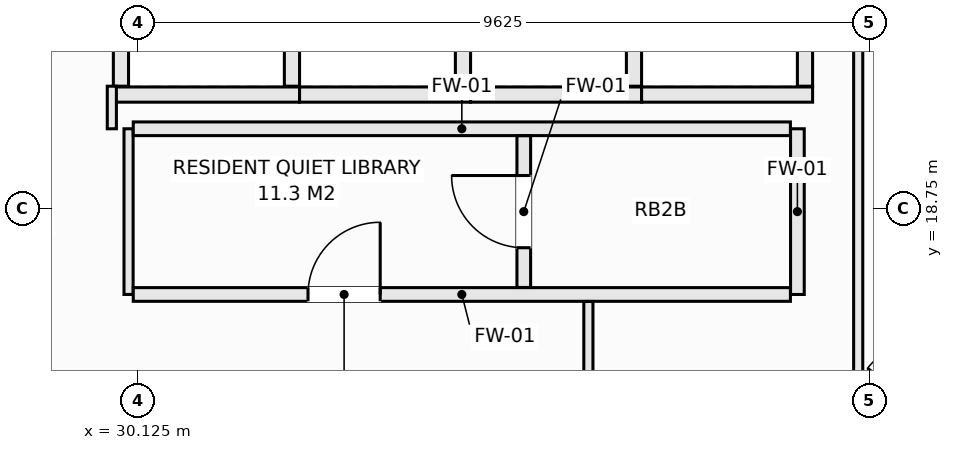
"""IFC4 building model, lengths in metres.
Left out: names, types, materials, properties, quantities, classifications, styles, units other than length and angle.
Written with IfcOpenShell. Run it as: python <this file> out.ifc"""

import sys

from ifc_helpers import new_model, si_unit, direction, frame, frame_2d, origin, place, context, subcontext, project, spatial, rectangle, extrude, element, fill, save


model = new_model("IFC4")
c1 = context("Model", 3, precision=1e-05, world=origin(), true_north=direction((0.0, 1.0)))
c2 = subcontext(c1, "Body", "Model", "MODEL_VIEW")
j1 = project(units=[si_unit("LENGTHUNIT", "METRE"), si_unit("PLANEANGLEUNIT", "RADIAN")], contexts=[c1])
p1 = place(None, origin())
s1 = spatial("IfcSite", under=j1, at=p1, CompositionType="ELEMENT")
p2 = place(p1, origin())
s2 = spatial("IfcBuilding", under=s1, at=p2, CompositionType="ELEMENT")
p3 = place(p2, frame((0.0, 0.0, 252.5)))
s3 = spatial("IfcBuildingStorey", under=s2, at=p3, CompositionType="ELEMENT", Elevation=252.5)
p4 = place(p3, frame((29.8, 20.25, 0.0), z_axis=(0.0, 0.0, 1.0), x_axis=(1.0, 0.0, 0.0)))
e1 = element("IfcWall", 1, at=p4, inside=s3, PredefinedType="SOLIDWALL", context=c2, shape_type="SweptSolid", body=[
    extrude(rectangle(XDim=2.45, YDim=0.2, at=frame_2d((1.225, 0.0))), origin(), (0.0, 0.0, 1.0), 3.03),
])
for number, where, z_axis, x_axis in (
    (2, (29.9, 20.36, 0.0), (0.0, 0.0, 1.0), (0.0, 1.0, 0.0)),
    (3, (32.15, 20.36, 0.0), (0.0, 0.0, 1.0), (0.0, 1.0, 0.0)),
):
    element("IfcWall", number, at=place(p3, frame(where, z_axis=z_axis, x_axis=x_axis)), inside=s3, PredefinedType="SOLIDWALL", context=c2, shape_type="SweptSolid", body=[
        extrude(rectangle(XDim=2.43, YDim=0.2, at=frame_2d((1.215, 0.0))), origin(), (0.0, 0.0, 1.0), 3.03),
    ])
p5 = place(p3, frame((32.25, 20.25, 0.0), z_axis=(0.0, 0.0, 1.0), x_axis=(1.0, 0.0, 0.0)))
e4 = element("IfcWall", 4, at=p5, inside=s3, PredefinedType="SOLIDWALL", context=c2, shape_type="SweptSolid", body=[
    extrude(rectangle(XDim=2.25, YDim=0.2, at=frame_2d((1.125, 0.0))), origin(), (0.0, 0.0, 1.0), 3.03),
])
p6 = place(p3, frame((34.4, 20.36, 0.0), z_axis=(0.0, 0.0, 1.0), x_axis=(0.0, 1.0, 0.0)))
e5 = element("IfcWall", 5, at=p6, inside=s3, PredefinedType="SOLIDWALL", context=c2, shape_type="SweptSolid", body=[
    extrude(rectangle(XDim=2.43, YDim=0.2, at=frame_2d((1.215, 0.0))), origin(), (0.0, 0.0, 1.0), 3.03),
])
p7 = place(p3, frame((34.5, 20.25, 0.0), z_axis=(0.0, 0.0, 1.0), x_axis=(1.0, 0.0, 0.0)))
e6 = element("IfcWall", 6, at=p7, inside=s3, PredefinedType="SOLIDWALL", context=c2, shape_type="SweptSolid", body=[
    extrude(rectangle(XDim=2.25, YDim=0.2, at=frame_2d((1.125, 0.0))), origin(), (0.0, 0.0, 1.0), 3.03),
])
p8 = place(p3, frame((36.65, 20.36, 0.0), z_axis=(0.0, 0.0, 1.0), x_axis=(0.0, 1.0, 0.0)))
e7 = element("IfcWall", 7, at=p8, inside=s3, PredefinedType="SOLIDWALL", context=c2, shape_type="SweptSolid", body=[
    extrude(rectangle(XDim=2.43, YDim=0.2, at=frame_2d((1.215, 0.0))), origin(), (0.0, 0.0, 1.0), 3.03),
])
p9 = place(p3, frame((36.75, 20.25, 0.0), z_axis=(0.0, 0.0, 1.0), x_axis=(1.0, 0.0, 0.0)))
e8 = element("IfcWall", 8, at=p9, inside=s3, PredefinedType="SOLIDWALL", context=c2, shape_type="SweptSolid", body=[
    extrude(rectangle(XDim=2.25, YDim=0.2, at=frame_2d((1.125, 0.0))), origin(), (0.0, 0.0, 1.0), 3.03),
])
p10 = place(p3, frame((38.9, 20.36, 0.0), z_axis=(0.0, 0.0, 1.0), x_axis=(0.0, 1.0, 0.0)))
e9 = element("IfcWall", 9, at=p10, inside=s3, PredefinedType="SOLIDWALL", context=c2, shape_type="SweptSolid", body=[
    extrude(rectangle(XDim=2.43, YDim=0.2, at=frame_2d((1.215, 0.0))), origin(), (0.0, 0.0, 1.0), 3.03),
])
p11 = place(p3, frame((30.0, 17.62, 0.0), z_axis=(0.0, 0.0, 1.0), x_axis=(0.0, 1.0, 0.0)))
e10 = element("IfcWall", 10, at=p11, inside=s3, PredefinedType="PARTITIONING", context=c2, shape_type="SweptSolid", body=[
    extrude(rectangle(XDim=2.18, YDim=0.12, at=frame_2d((1.09, 0.0))), origin(), (0.0, 0.0, 1.0), 3.03),
])
p12 = place(p3, frame((38.8, 17.62, 0.0), z_axis=(0.0, 0.0, 1.0), x_axis=(0.0, 1.0, 0.0)))
e11 = element("IfcWall", 11, at=p12, inside=s3, PredefinedType="SOLIDWALL", context=c2, shape_type="SweptSolid", body=[
    extrude(rectangle(XDim=2.18, YDim=0.18, at=frame_2d((1.09, 0.0))), origin(), (0.0, 0.0, 1.0), 3.03),
])
p13 = place(p3, frame((30.062, 17.62, 0.0), z_axis=(0.0, 0.0, 1.0), x_axis=(1.0, 0.0, 0.0)))
e12 = element("IfcWall", 12, at=p13, inside=s3, PredefinedType="SOLIDWALL", context=c2, shape_type="SweptSolid", body=[
    extrude(rectangle(XDim=8.646, YDim=0.18, at=frame_2d((4.323, 0.0))), origin(), (0.0, 0.0, 1.0), 3.03),
])
p14 = place(p13, frame((2.299, 0.0, 0.0)))
e13 = element("IfcOpeningElement", 13, at=p14, cuts=e12, PredefinedType="OPENING", context=c2, shape_type="SweptSolid", body=[
    extrude(rectangle(XDim=0.95, YDim=2.1, at=frame_2d((0.475, 1.05))), frame((0.0, 0.1, 0.0), z_axis=(0.0, -1.0, 0.0), x_axis=(1.0, 0.0, 0.0)), (0.0, 0.0, 1.0), 0.2),
])
p15 = place(p3, frame((30.062, 19.8, 0.0), z_axis=(0.0, 0.0, 1.0), x_axis=(1.0, 0.0, 0.0)))
e14 = element("IfcWall", 14, at=p15, inside=s3, PredefinedType="SOLIDWALL", context=c2, shape_type="SweptSolid", body=[
    extrude(rectangle(XDim=8.646, YDim=0.18, at=frame_2d((4.323, 0.0))), origin(), (0.0, 0.0, 1.0), 3.03),
])
p16 = place(p3, frame((35.2, 17.712, 0.0), z_axis=(0.0, 0.0, 1.0), x_axis=(0.0, 1.0, 0.0)))
e15 = element("IfcWall", 15, at=p16, inside=s3, PredefinedType="SOLIDWALL", context=c2, shape_type="SweptSolid", body=[
    extrude(rectangle(XDim=1.996, YDim=0.18, at=frame_2d((0.998, 0.0))), origin(), (0.0, 0.0, 1.0), 3.03),
])
p17 = place(p16, frame((0.523, 0.0, 0.0)))
e16 = element("IfcOpeningElement", 16, at=p17, cuts=e15, PredefinedType="OPENING", context=c2, shape_type="SweptSolid", body=[
    extrude(rectangle(XDim=0.95, YDim=2.1, at=frame_2d((0.475, 1.05))), frame((0.0, 0.1, 0.0), z_axis=(0.0, -1.0, 0.0), x_axis=(1.0, 0.0, 0.0)), (0.0, 0.0, 1.0), 0.2),
])
p18 = place(p3, frame((39.6, 14.952, 0.0), z_axis=(0.0, 0.0, 1.0), x_axis=(0.0, 1.0, 0.0)))
e17 = element("IfcWall", 17, at=p18, inside=s3, PredefinedType="PARTITIONING", context=c2, shape_type="SweptSolid", body=[
    extrude(rectangle(XDim=8.068, YDim=0.12, at=frame_2d((4.034, 0.0))), origin(), (0.0, 0.0, 1.0), 2.478),
])
p19 = place(p3, frame((39.662, 15.031, 0.0), z_axis=(0.0, 0.0, 1.0), x_axis=(0.616500468458, 0.787354540465, 0.0)))
e18 = element("IfcWall", 18, at=p19, inside=s3, PredefinedType="PARTITIONING", context=c2, shape_type="SweptSolid", body=[
    extrude(rectangle(XDim=3.014, YDim=0.12, at=frame_2d((1.507, 0.0))), origin(), (0.0, 0.0, 1.0), 3.03),
])
p20 = place(p19, frame((1.312, 0.0, 0.0)))
e19 = element("IfcOpeningElement", 19, at=p20, cuts=e18, PredefinedType="OPENING", context=c2, shape_type="SweptSolid", body=[
    extrude(rectangle(XDim=0.95, YDim=2.1, at=frame_2d((0.475, 1.05))), frame((0.0, 0.07, 0.0), z_axis=(0.0, -1.0, 0.0), x_axis=(1.0, 0.0, 0.0)), (0.0, 0.0, 1.0), 0.14),
])
p21 = place(p3, frame((29.78, 19.8, 0.0), z_axis=(0.0, 0.0, 1.0), x_axis=(0.0, 1.0, 0.0)))
e20 = element("IfcWall", 20, at=p21, inside=s3, PredefinedType="PARTITIONING", context=c2, shape_type="SweptSolid", body=[
    extrude(rectangle(XDim=0.56, YDim=0.12, at=frame_2d((0.28, 0.0))), origin(), (0.0, 0.0, 1.0), 3.03),
])
p22 = place(p3, frame((36.05, 16.32, 0.0), z_axis=(0.0, 0.0, 1.0), x_axis=(0.0, 1.0, 0.0)))
e21 = element("IfcWall", 21, at=p22, inside=s3, PredefinedType="PARTITIONING", context=c2, shape_type="SweptSolid", body=[
    extrude(rectangle(XDim=1.208, YDim=0.12, at=frame_2d((0.604, 0.0))), origin(), (0.0, 0.0, 1.0), 3.03),
])
p23 = place(p14, origin())
e22 = element("IfcDoor", 22, at=p23, inside=s3, OperationType="SINGLE_SWING_RIGHT", PredefinedType="DOOR", context=c2, shape_type="SweptSolid", body=[
    extrude(rectangle(XDim=0.95, YDim=2.1, at=frame_2d((0.475, 1.05))), frame((0.0, 0.025, 0.0), z_axis=(0.0, -1.0, 0.0), x_axis=(1.0, 0.0, 0.0)), (0.0, 0.0, 1.0), 0.05),
])
fill(e13, e22)
p24 = place(p17, origin())
e23 = element("IfcDoor", 23, at=p24, inside=s3, OperationType="SINGLE_SWING_RIGHT", PredefinedType="DOOR", context=c2, shape_type="SweptSolid", body=[
    extrude(rectangle(XDim=0.95, YDim=2.1, at=frame_2d((0.475, 1.05))), frame((0.0, 0.025, 0.0), z_axis=(0.0, -1.0, 0.0), x_axis=(1.0, 0.0, 0.0)), (0.0, 0.0, 1.0), 0.05),
])
fill(e16, e23)
save(model, sys.argv[1])
